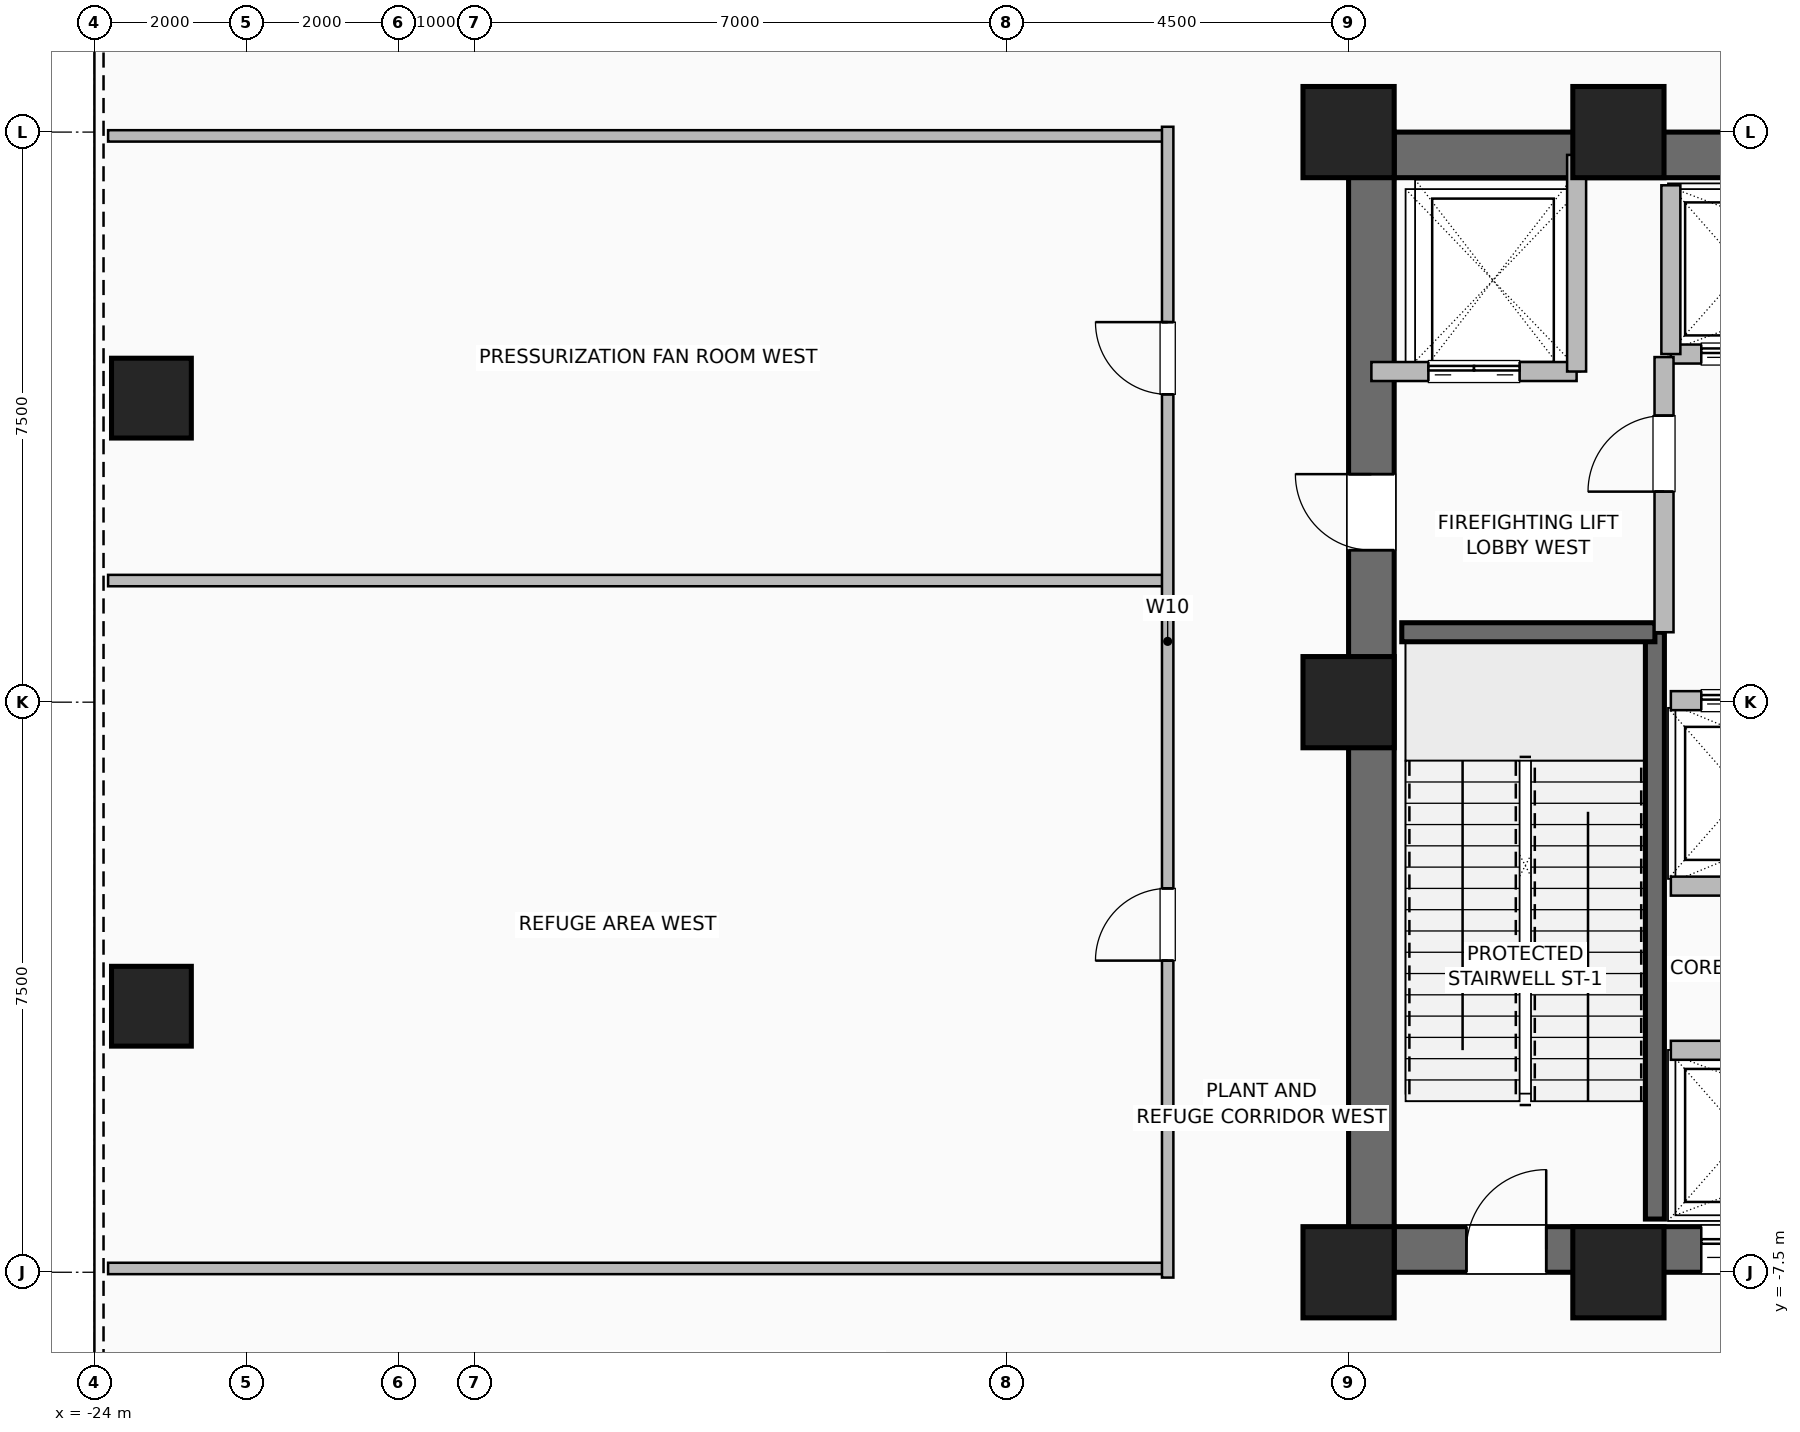
"""IFC4 building model, lengths in metres.
Left out: names, types, materials, properties, quantities, classifications, styles, units other than length and angle.
Written with IfcOpenShell. Run it as: python <this file> out.ifc"""

import sys

from ifc_helpers import new_model, si_unit, direction, frame, frame_2d, origin, origin_2d, place, context, subcontext, project, spatial, rectangle, hollow_rectangle, extrude, element, fill, save


model = new_model("IFC4")
c1 = context("Model", 3, precision=1e-05, world=origin(), true_north=direction((0.0, 1.0)))
c2 = subcontext(c1, "Body", "Model", "MODEL_VIEW")
j1 = project(units=[si_unit("LENGTHUNIT", "METRE"), si_unit("PLANEANGLEUNIT", "RADIAN")], contexts=[c1])
p1 = place(None, origin())
s1 = spatial("IfcSite", under=j1, at=p1, CompositionType="ELEMENT")
p2 = place(p1, origin())
s2 = spatial("IfcBuilding", under=s1, at=p2, CompositionType="ELEMENT")
p3 = place(p2, frame((0.0, 0.0, 88.0)))
s3 = spatial("IfcBuildingStorey", under=s2, at=p3, CompositionType="ELEMENT", Elevation=88.0)
for number, where, z_axis, x_axis in (
    (1, (-7.5, -7.5, 0.0), (0.0, 0.0, 1.0), (1.0, 0.0, 0.0)),
    (2, (-3.95, -7.5, 0.0), (0.0, 0.0, 1.0), (1.0, 0.0, 0.0)),
    (3, (-3.95, 7.5, 0.0), (0.0, 0.0, 1.0), (1.0, 0.0, 0.0)),
    (4, (-7.5, 7.5, 0.0), (0.0, 0.0, 1.0), (1.0, 0.0, 0.0)),
    (5, (-7.5, 0.0, 0.0), (0.0, 0.0, 1.0), (1.0, 0.0, 0.0)),
):
    element("IfcColumn", number, at=place(p3, frame(where, z_axis=z_axis, x_axis=x_axis)), inside=s3, PredefinedType="COLUMN", context=c2, shape_type="SweptSolid", body=[
        extrude(hollow_rectangle(XDim=1.2, YDim=1.2, WallThickness=0.055, at=origin_2d()), origin(), (0.0, 0.0, 1.0), 6.0),
    ])
for number, where, z_axis, x_axis in (
    (6, (-23.25, -4.0, 0.0), (0.0, 0.0, 1.0), (1.0, 0.0, 0.0)),
    (7, (-23.25, 4.0, 0.0), (0.0, 0.0, 1.0), (1.0, 0.0, 0.0)),
):
    element("IfcColumn", number, at=place(p3, frame(where, z_axis=z_axis, x_axis=x_axis)), inside=s3, PredefinedType="COLUMN", context=c2, shape_type="SweptSolid", body=[
        extrude(hollow_rectangle(XDim=1.05, YDim=1.05, WallThickness=0.05, at=origin_2d()), origin(), (0.0, 0.0, 1.0), 5.6),
    ])
p4 = place(p3, frame((-7.5, -7.2, 0.0), z_axis=(0.0, 0.0, 1.0), x_axis=(1.0, 0.0, 0.0)))
e8 = element("IfcWall", 8, at=p4, inside=s3, PredefinedType="SHEAR", context=c2, shape_type="SweptSolid", body=[
    extrude(rectangle(XDim=15.0, YDim=0.6, at=frame_2d((7.5, 0.0))), origin(), (0.0, 0.0, 1.0), 5.6),
])
p5 = place(p4, frame((1.55, 0.0, 0.0)))
e9 = element("IfcOpeningElement", 9, at=p5, cuts=e8, PredefinedType="OPENING", context=c2, shape_type="SweptSolid", body=[
    extrude(rectangle(XDim=1.05, YDim=2.08, at=frame_2d((0.525, 1.04))), frame((0.0, 0.31, 0.0), z_axis=(0.0, -1.0, 0.0), x_axis=(1.0, 0.0, 0.0)), (0.0, 0.0, 1.0), 0.62),
])
p6 = place(p4, frame((12.4, 0.0, 0.0)))
e10 = element("IfcOpeningElement", 10, at=p6, cuts=e8, PredefinedType="OPENING", context=c2, shape_type="SweptSolid", body=[
    extrude(rectangle(XDim=1.05, YDim=2.08, at=frame_2d((0.525, 1.04))), frame((0.0, 0.31, 0.0), z_axis=(0.0, -1.0, 0.0), x_axis=(1.0, 0.0, 0.0)), (0.0, 0.0, 1.0), 0.62),
])
p7 = place(p4, frame((4.64, 0.0, 0.0)))
e11 = element("IfcOpeningElement", 11, at=p7, cuts=e8, PredefinedType="OPENING", context=c2, shape_type="SweptSolid", body=[
    extrude(rectangle(XDim=1.1, YDim=2.2, at=frame_2d((0.55, 1.1))), frame((0.0, 0.31, 0.0), z_axis=(0.0, -1.0, 0.0), x_axis=(1.0, 0.0, 0.0)), (0.0, 0.0, 1.0), 0.62),
])
p8 = place(p4, frame((6.52, 0.0, 0.0)))
e12 = element("IfcOpeningElement", 12, at=p8, cuts=e8, PredefinedType="OPENING", context=c2, shape_type="SweptSolid", body=[
    extrude(rectangle(XDim=1.1, YDim=2.2, at=frame_2d((0.55, 1.1))), frame((0.0, 0.31, 0.0), z_axis=(0.0, -1.0, 0.0), x_axis=(1.0, 0.0, 0.0)), (0.0, 0.0, 1.0), 0.62),
])
p9 = place(p4, frame((8.4, 0.0, 0.0)))
e13 = element("IfcOpeningElement", 13, at=p9, cuts=e8, PredefinedType="OPENING", context=c2, shape_type="SweptSolid", body=[
    extrude(rectangle(XDim=1.1, YDim=2.2, at=frame_2d((0.55, 1.1))), frame((0.0, 0.31, 0.0), z_axis=(0.0, -1.0, 0.0), x_axis=(1.0, 0.0, 0.0)), (0.0, 0.0, 1.0), 0.62),
])
p10 = place(p3, frame((-7.5, 7.2, 0.0), z_axis=(0.0, 0.0, 1.0), x_axis=(1.0, 0.0, 0.0)))
e14 = element("IfcWall", 14, at=p10, inside=s3, PredefinedType="SHEAR", context=c2, shape_type="SweptSolid", body=[
    extrude(rectangle(XDim=15.0, YDim=0.6, at=frame_2d((7.5, 0.0))), origin(), (0.0, 0.0, 1.0), 5.6),
])
p11 = place(p3, frame((-7.2, -7.5, 0.0), z_axis=(0.0, 0.0, 1.0), x_axis=(0.0, 1.0, 0.0)))
e15 = element("IfcWall", 15, at=p11, inside=s3, PredefinedType="SHEAR", context=c2, shape_type="SweptSolid", body=[
    extrude(rectangle(XDim=15.0, YDim=0.6, at=frame_2d((7.5, 0.0))), origin(), (0.0, 0.0, 1.0), 5.6),
])
p12 = place(p11, frame((9.5, 0.0, 0.0)))
e16 = element("IfcOpeningElement", 16, at=p12, cuts=e15, PredefinedType="OPENING", context=c2, shape_type="SweptSolid", body=[
    extrude(rectangle(XDim=1.0, YDim=2.08, at=frame_2d((0.5, 1.04))), frame((0.0, 0.31, 0.0), z_axis=(0.0, -1.0, 0.0), x_axis=(1.0, 0.0, 0.0)), (0.0, 0.0, 1.0), 0.62),
])
p13 = place(p3, frame((-3.47, -6.8, 0.0), z_axis=(0.0, 0.0, 1.0), x_axis=(0.0, 1.0, 0.0)))
e17 = element("IfcWall", 17, at=p13, inside=s3, PredefinedType="SHEAR", context=c2, shape_type="SweptSolid", body=[
    extrude(rectangle(XDim=7.72, YDim=0.25, at=frame_2d((3.86, 0.0))), origin(), (0.0, 0.0, 1.0), 5.6),
])
p14 = place(p3, frame((-6.8, 0.92, 0.0), z_axis=(0.0, 0.0, 1.0), x_axis=(1.0, 0.0, 0.0)))
e18 = element("IfcWall", 18, at=p14, inside=s3, PredefinedType="SHEAR", context=c2, shape_type="SweptSolid", body=[
    extrude(rectangle(XDim=3.33, YDim=0.25, at=frame_2d((1.665, 0.0))), origin(), (0.0, 0.0, 1.0), 5.6),
])
p15 = place(p3, frame((-3.26, -4.58, 0.0), z_axis=(0.0, 0.0, 1.0), x_axis=(1.0, 0.0, 0.0)))
e19 = element("IfcWall", 19, at=p15, inside=s3, PredefinedType="SHEAR", context=c2, shape_type="SweptSolid", body=[
    extrude(rectangle(XDim=5.64, YDim=0.25, at=frame_2d((2.82, 0.0))), origin(), (0.0, 0.0, 1.0), 5.6),
])
p16 = place(p3, frame((-3.26, 0.02, 0.0), z_axis=(0.0, 0.0, 1.0), x_axis=(1.0, 0.0, 0.0)))
e20 = element("IfcWall", 20, at=p16, inside=s3, PredefinedType="SHEAR", context=c2, shape_type="SweptSolid", body=[
    extrude(rectangle(XDim=5.64, YDim=0.25, at=frame_2d((2.82, 0.0))), origin(), (0.0, 0.0, 1.0), 5.6),
])
p17 = place(p16, frame((0.4, 0.0, 0.0)))
e21 = element("IfcOpeningElement", 21, at=p17, cuts=e20, PredefinedType="OPENING", context=c2, shape_type="SweptSolid", body=[
    extrude(rectangle(XDim=1.1, YDim=2.2, at=frame_2d((0.55, 1.1))), frame((0.0, 0.135, 0.0), z_axis=(0.0, -1.0, 0.0), x_axis=(1.0, 0.0, 0.0)), (0.0, 0.0, 1.0), 0.27),
])
p18 = place(p16, frame((2.28, 0.0, 0.0)))
e22 = element("IfcOpeningElement", 22, at=p18, cuts=e20, PredefinedType="OPENING", context=c2, shape_type="SweptSolid", body=[
    extrude(rectangle(XDim=1.1, YDim=2.2, at=frame_2d((0.55, 1.1))), frame((0.0, 0.135, 0.0), z_axis=(0.0, -1.0, 0.0), x_axis=(1.0, 0.0, 0.0)), (0.0, 0.0, 1.0), 0.27),
])
p19 = place(p16, frame((4.16, 0.0, 0.0)))
e23 = element("IfcOpeningElement", 23, at=p19, cuts=e20, PredefinedType="OPENING", context=c2, shape_type="SweptSolid", body=[
    extrude(rectangle(XDim=1.1, YDim=2.2, at=frame_2d((0.55, 1.1))), frame((0.0, 0.135, 0.0), z_axis=(0.0, -1.0, 0.0), x_axis=(1.0, 0.0, 0.0)), (0.0, 0.0, 1.0), 0.27),
])
p20 = place(p3, frame((-3.26, -2.42, 0.0), z_axis=(0.0, 0.0, 1.0), x_axis=(1.0, 0.0, 0.0)))
e24 = element("IfcWall", 24, at=p20, inside=s3, PredefinedType="SHEAR", context=c2, shape_type="SweptSolid", body=[
    extrude(rectangle(XDim=5.64, YDim=0.25, at=frame_2d((2.82, 0.0))), origin(), (0.0, 0.0, 1.0), 5.6),
])
p21 = place(p3, frame((-3.26, 4.58, 0.0), z_axis=(0.0, 0.0, 1.0), x_axis=(1.0, 0.0, 0.0)))
e25 = element("IfcWall", 25, at=p21, inside=s3, PredefinedType="SHEAR", context=c2, shape_type="SweptSolid", body=[
    extrude(rectangle(XDim=5.64, YDim=0.25, at=frame_2d((2.82, 0.0))), origin(), (0.0, 0.0, 1.0), 5.6),
])
p22 = place(p21, frame((0.4, 0.0, 0.0)))
e26 = element("IfcOpeningElement", 26, at=p22, cuts=e25, PredefinedType="OPENING", context=c2, shape_type="SweptSolid", body=[
    extrude(rectangle(XDim=1.1, YDim=2.2, at=frame_2d((0.55, 1.1))), frame((0.0, 0.135, 0.0), z_axis=(0.0, -1.0, 0.0), x_axis=(1.0, 0.0, 0.0)), (0.0, 0.0, 1.0), 0.27),
])
p23 = place(p21, frame((2.28, 0.0, 0.0)))
e27 = element("IfcOpeningElement", 27, at=p23, cuts=e25, PredefinedType="OPENING", context=c2, shape_type="SweptSolid", body=[
    extrude(rectangle(XDim=1.1, YDim=2.2, at=frame_2d((0.55, 1.1))), frame((0.0, 0.135, 0.0), z_axis=(0.0, -1.0, 0.0), x_axis=(1.0, 0.0, 0.0)), (0.0, 0.0, 1.0), 0.27),
])
p24 = place(p21, frame((4.16, 0.0, 0.0)))
e28 = element("IfcOpeningElement", 28, at=p24, cuts=e25, PredefinedType="OPENING", context=c2, shape_type="SweptSolid", body=[
    extrude(rectangle(XDim=1.1, YDim=2.2, at=frame_2d((0.55, 1.1))), frame((0.0, 0.135, 0.0), z_axis=(0.0, -1.0, 0.0), x_axis=(1.0, 0.0, 0.0)), (0.0, 0.0, 1.0), 0.27),
])
p25 = place(p3, frame((-3.26, 4.58, 0.0), z_axis=(0.0, 0.0, 1.0), x_axis=(0.0, 1.0, 0.0)))
e29 = element("IfcWall", 29, at=p25, inside=s3, PredefinedType="SHEAR", context=c2, shape_type="SweptSolid", body=[
    extrude(rectangle(XDim=2.22, YDim=0.25, at=frame_2d((1.11, 0.0))), origin(), (0.0, 0.0, 1.0), 5.6),
])
p26 = place(p3, frame((-7.2, 4.35, 0.0), z_axis=(0.0, 0.0, 1.0), x_axis=(1.0, 0.0, 0.0)))
e30 = element("IfcWall", 30, at=p26, inside=s3, PredefinedType="SHEAR", context=c2, shape_type="SweptSolid", body=[
    extrude(rectangle(XDim=2.7, YDim=0.25, at=frame_2d((1.35, 0.0))), origin(), (0.0, 0.0, 1.0), 5.6),
])
p27 = place(p26, frame((0.75, 0.0, 0.0)))
e31 = element("IfcOpeningElement", 31, at=p27, cuts=e30, PredefinedType="OPENING", context=c2, shape_type="SweptSolid", body=[
    extrude(rectangle(XDim=1.2, YDim=2.2, at=frame_2d((0.6, 1.1))), frame((0.0, 0.135, 0.0), z_axis=(0.0, -1.0, 0.0), x_axis=(1.0, 0.0, 0.0)), (0.0, 0.0, 1.0), 0.27),
])
p28 = place(p3, frame((-4.5, 4.35, 0.0), z_axis=(0.0, 0.0, 1.0), x_axis=(0.0, 1.0, 0.0)))
e32 = element("IfcWall", 32, at=p28, inside=s3, PredefinedType="SHEAR", context=c2, shape_type="SweptSolid", body=[
    extrude(rectangle(XDim=2.85, YDim=0.25, at=frame_2d((1.425, 0.0))), origin(), (0.0, 0.0, 1.0), 5.6),
])
p29 = place(p3, frame((-3.35, 0.92, 0.0), z_axis=(0.0, 0.0, 1.0), x_axis=(0.0, 1.0, 0.0)))
e33 = element("IfcWall", 33, at=p29, inside=s3, PredefinedType="SHEAR", context=c2, shape_type="SweptSolid", body=[
    extrude(rectangle(XDim=3.62, YDim=0.25, at=frame_2d((1.81, 0.0))), origin(), (0.0, 0.0, 1.0), 5.6),
])
p30 = place(p29, frame((1.85, 0.0, 0.0)))
e34 = element("IfcOpeningElement", 34, at=p30, cuts=e33, PredefinedType="OPENING", context=c2, shape_type="SweptSolid", body=[
    extrude(rectangle(XDim=1.0, YDim=2.08, at=frame_2d((0.5, 1.04))), frame((0.0, 0.135, 0.0), z_axis=(0.0, -1.0, 0.0), x_axis=(1.0, 0.0, 0.0)), (0.0, 0.0, 1.0), 0.27),
])
p31 = place(p3, frame((-23.82, -7.45, 0.0), z_axis=(0.0, 0.0, 1.0), x_axis=(1.0, 0.0, 0.0)))
e35 = element("IfcWall", 35, at=p31, inside=s3, PredefinedType="PARTITIONING", context=c2, shape_type="SweptSolid", body=[
    extrude(rectangle(XDim=13.94, YDim=0.15, at=frame_2d((6.97, 0.0))), origin(), (0.0, 0.0, 1.0), 3.975),
])
p32 = place(p3, frame((-23.82, 1.6, 0.0), z_axis=(0.0, 0.0, 1.0), x_axis=(1.0, 0.0, 0.0)))
e36 = element("IfcWall", 36, at=p32, inside=s3, PredefinedType="PARTITIONING", context=c2, shape_type="SweptSolid", body=[
    extrude(rectangle(XDim=13.94, YDim=0.15, at=frame_2d((6.97, 0.0))), origin(), (0.0, 0.0, 1.0), 5.6),
])
p33 = place(p3, frame((-23.82, 7.45, 0.0), z_axis=(0.0, 0.0, 1.0), x_axis=(1.0, 0.0, 0.0)))
e37 = element("IfcWall", 37, at=p33, inside=s3, PredefinedType="PARTITIONING", context=c2, shape_type="SweptSolid", body=[
    extrude(rectangle(XDim=13.94, YDim=0.15, at=frame_2d((6.97, 0.0))), origin(), (0.0, 0.0, 1.0), 3.975),
])
p34 = place(p3, frame((-9.88, -7.57, 0.0), z_axis=(0.0, 0.0, 1.0), x_axis=(0.0, 1.0, 0.0)))
e38 = element("IfcWall", 38, at=p34, inside=s3, PredefinedType="PARTITIONING", context=c2, shape_type="SweptSolid", body=[
    extrude(rectangle(XDim=15.14, YDim=0.15, at=frame_2d((7.57, 0.0))), origin(), (0.0, 0.0, 1.0), 5.6),
])
p35 = place(p34, frame((4.17, 0.0, 0.0)))
e39 = element("IfcOpeningElement", 39, at=p35, cuts=e38, PredefinedType="OPENING", context=c2, shape_type="SweptSolid", body=[
    extrude(rectangle(XDim=0.95, YDim=2.06, at=frame_2d((0.475, 1.03))), frame((0.0, 0.085, 0.0), z_axis=(0.0, -1.0, 0.0), x_axis=(1.0, 0.0, 0.0)), (0.0, 0.0, 1.0), 0.17),
])
p36 = place(p34, frame((11.62, 0.0, 0.0)))
e40 = element("IfcOpeningElement", 40, at=p36, cuts=e38, PredefinedType="OPENING", context=c2, shape_type="SweptSolid", body=[
    extrude(rectangle(XDim=0.95, YDim=2.06, at=frame_2d((0.475, 1.03))), frame((0.0, 0.085, 0.0), z_axis=(0.0, -1.0, 0.0), x_axis=(1.0, 0.0, 0.0)), (0.0, 0.0, 1.0), 0.17),
])
p37 = place(p5, origin())
e41 = element("IfcDoor", 41, at=p37, inside=s3, OperationType="SINGLE_SWING_RIGHT", PredefinedType="DOOR", context=c2, shape_type="SweptSolid", body=[
    extrude(rectangle(XDim=1.05, YDim=2.08, at=frame_2d((0.525, 1.04))), frame((0.0, 0.025, 0.0), z_axis=(0.0, -1.0, 0.0), x_axis=(1.0, 0.0, 0.0)), (0.0, 0.0, 1.0), 0.05),
])
fill(e9, e41)
p38 = place(p12, origin())
e42 = element("IfcDoor", 42, at=p38, inside=s3, OperationType="SINGLE_SWING_RIGHT", PredefinedType="DOOR", context=c2, shape_type="SweptSolid", body=[
    extrude(rectangle(XDim=1.0, YDim=2.08, at=frame_2d((0.5, 1.04))), frame((0.0, 0.025, 0.0), z_axis=(0.0, -1.0, 0.0), x_axis=(1.0, 0.0, 0.0)), (0.0, 0.0, 1.0), 0.05),
])
fill(e16, e42)
p39 = place(p7, origin())
e43 = element("IfcDoor", 43, at=p39, inside=s3, OperationType="DOUBLE_DOOR_SLIDING", PredefinedType="DOOR", context=c2, shape_type="SweptSolid", body=[
    extrude(rectangle(XDim=1.1, YDim=2.2, at=frame_2d((0.55, 1.1))), frame((0.0, 0.025, 0.0), z_axis=(0.0, -1.0, 0.0), x_axis=(1.0, 0.0, 0.0)), (0.0, 0.0, 1.0), 0.05),
])
fill(e11, e43)
p40 = place(p17, origin())
e44 = element("IfcDoor", 44, at=p40, inside=s3, OperationType="DOUBLE_DOOR_SLIDING", PredefinedType="DOOR", context=c2, shape_type="SweptSolid", body=[
    extrude(rectangle(XDim=1.1, YDim=2.2, at=frame_2d((0.55, 1.1))), frame((0.0, 0.025, 0.0), z_axis=(0.0, -1.0, 0.0), x_axis=(1.0, 0.0, 0.0)), (0.0, 0.0, 1.0), 0.05),
])
fill(e21, e44)
p41 = place(p22, origin())
e45 = element("IfcDoor", 45, at=p41, inside=s3, OperationType="DOUBLE_DOOR_SLIDING", PredefinedType="DOOR", context=c2, shape_type="SweptSolid", body=[
    extrude(rectangle(XDim=1.1, YDim=2.2, at=frame_2d((0.55, 1.1))), frame((0.0, 0.025, 0.0), z_axis=(0.0, -1.0, 0.0), x_axis=(1.0, 0.0, 0.0)), (0.0, 0.0, 1.0), 0.05),
])
fill(e26, e45)
p42 = place(p27, origin())
e46 = element("IfcDoor", 46, at=p42, inside=s3, OperationType="DOUBLE_DOOR_SLIDING", PredefinedType="DOOR", context=c2, shape_type="SweptSolid", body=[
    extrude(rectangle(XDim=1.2, YDim=2.2, at=frame_2d((0.6, 1.1))), frame((0.0, 0.025, 0.0), z_axis=(0.0, -1.0, 0.0), x_axis=(1.0, 0.0, 0.0)), (0.0, 0.0, 1.0), 0.05),
])
fill(e31, e46)
p43 = place(p30, origin())
e47 = element("IfcDoor", 47, at=p43, inside=s3, OperationType="SINGLE_SWING_LEFT", PredefinedType="DOOR", context=c2, shape_type="SweptSolid", body=[
    extrude(rectangle(XDim=1.0, YDim=2.08, at=frame_2d((0.5, 1.04))), frame((0.0, 0.025, 0.0), z_axis=(0.0, -1.0, 0.0), x_axis=(1.0, 0.0, 0.0)), (0.0, 0.0, 1.0), 0.05),
])
fill(e34, e47)
p44 = place(p35, origin())
e48 = element("IfcDoor", 48, at=p44, inside=s3, OperationType="SINGLE_SWING_LEFT", PredefinedType="DOOR", context=c2, shape_type="SweptSolid", body=[
    extrude(rectangle(XDim=0.95, YDim=2.06, at=frame_2d((0.475, 1.03))), frame((0.0, 0.025, 0.0), z_axis=(0.0, -1.0, 0.0), x_axis=(1.0, 0.0, 0.0)), (0.0, 0.0, 1.0), 0.05),
])
fill(e39, e48)
p45 = place(p36, origin())
e49 = element("IfcDoor", 49, at=p45, inside=s3, OperationType="SINGLE_SWING_RIGHT", PredefinedType="DOOR", context=c2, shape_type="SweptSolid", body=[
    extrude(rectangle(XDim=0.95, YDim=2.06, at=frame_2d((0.475, 1.03))), frame((0.0, 0.025, 0.0), z_axis=(0.0, -1.0, 0.0), x_axis=(1.0, 0.0, 0.0)), (0.0, 0.0, 1.0), 0.05),
])
fill(e40, e49)
save(model, sys.argv[1])
